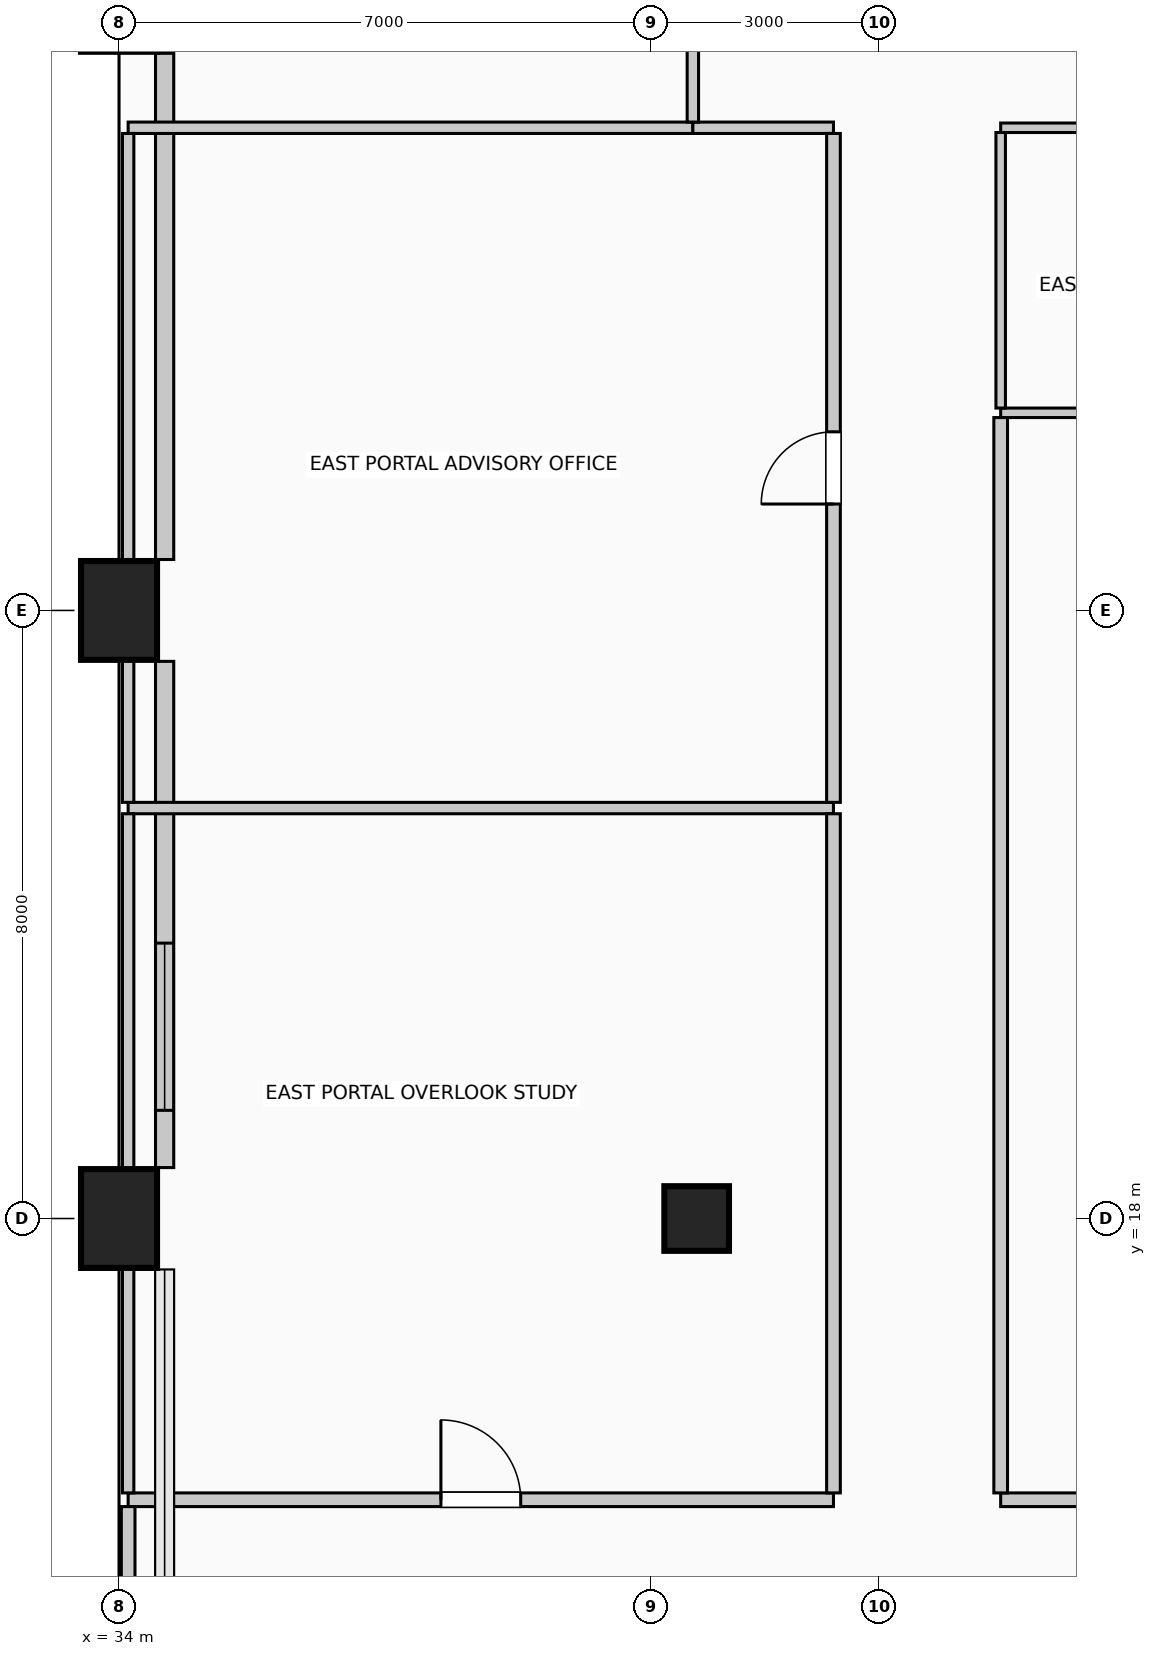
"""IFC4 building model, lengths in metres.
Left out: names, types, materials, properties, quantities, classifications, styles, units other than length and angle.
Written with IfcOpenShell. Run it as: python <this file> out.ifc"""

import sys

from ifc_helpers import new_model, si_unit, direction, frame, frame_2d, origin, origin_2d, place, context, subcontext, project, spatial, rectangle, circle, extrude, element, fill, save


model = new_model("IFC4")
c1 = context("Model", 3, precision=1e-05, world=origin(), true_north=direction((0.0, 1.0)))
c2 = subcontext(c1, "Body", "Model", "MODEL_VIEW")
j1 = project(units=[si_unit("LENGTHUNIT", "METRE"), si_unit("PLANEANGLEUNIT", "RADIAN")], contexts=[c1])
p1 = place(None, origin())
s1 = spatial("IfcSite", under=j1, at=p1, CompositionType="ELEMENT")
p2 = place(p1, origin())
s2 = spatial("IfcBuilding", under=s1, at=p2, CompositionType="ELEMENT")
p3 = place(p2, frame((0.0, 0.0, 190.6)))
s3 = spatial("IfcBuildingStorey", under=s2, at=p3, CompositionType="ELEMENT", Elevation=190.6)
for number, where, z_axis, x_axis in (
    (1, (34.0, 18.0, 0.0), (0.0, 0.0, 1.0), (1.0, 0.0, 0.0)),
    (2, (34.0, 26.0, 0.0), (0.0, 0.0, 1.0), (1.0, 0.0, 0.0)),
    (3, (34.0, 34.0, 0.0), (0.0, 0.0, 1.0), (1.0, 0.0, 0.0)),
):
    element("IfcColumn", number, at=place(p3, frame(where, z_axis=z_axis, x_axis=x_axis)), inside=s3, PredefinedType="COLUMN", context=c2, shape_type="SweptSolid", body=[
        extrude(rectangle(XDim=1.0, YDim=1.3, at=origin_2d()), origin(), (0.0, 0.0, 1.0), 4.0),
    ])
p4 = place(p3, frame((41.6, 18.0, 0.0), z_axis=(0.0, 0.0, 1.0), x_axis=(1.0, 0.0, 0.0)))
e4 = element("IfcColumn", 4, at=p4, inside=s3, PredefinedType="COLUMN", context=c2, shape_type="SweptSolid", body=[
    extrude(circle(Radius=0.425, at=origin_2d()), origin(), (0.0, 0.0, 1.0), 4.0),
])
p5 = place(p3, frame((34.6, 18.67, 0.0), z_axis=(0.0, 0.0, 1.0), x_axis=(0.0, 1.0, 0.0)))
e5 = element("IfcWall", 5, at=p5, inside=s3, PredefinedType="SOLIDWALL", context=c2, shape_type="SweptSolid", body=[
    extrude(rectangle(XDim=6.66, YDim=0.24, at=frame_2d((3.33, 0.0))), origin(), (0.0, 0.0, 1.0), 3.75),
])
p6 = place(p5, frame((0.753, 0.0, 0.42)))
e6 = element("IfcOpeningElement", 6, at=p6, cuts=e5, PredefinedType="OPENING", context=c2, shape_type="SweptSolid", body=[
    extrude(rectangle(XDim=2.2, YDim=1.95, at=frame_2d((1.1, 0.975))), frame((0.0, 0.13, 0.0), z_axis=(0.0, -1.0, 0.0), x_axis=(1.0, 0.0, 0.0)), (0.0, 0.0, 1.0), 0.26),
])
p7 = place(p3, frame((34.6, 26.67, 0.0), z_axis=(0.0, 0.0, 1.0), x_axis=(0.0, 1.0, 0.0)))
e7 = element("IfcWall", 7, at=p7, inside=s3, PredefinedType="SOLIDWALL", context=c2, shape_type="SweptSolid", body=[
    extrude(rectangle(XDim=6.66, YDim=0.24, at=frame_2d((3.33, 0.0))), origin(), (0.0, 0.0, 1.0), 3.75),
])
p8 = place(p3, frame((34.12, 14.3, 0.0), z_axis=(0.0, 0.0, 1.0), x_axis=(1.0, 0.0, 0.0)))
e8 = element("IfcWall", 8, at=p8, inside=s3, PredefinedType="PARTITIONING", context=c2, shape_type="SweptSolid", body=[
    extrude(rectangle(XDim=9.28, YDim=0.18, at=frame_2d((4.64, 0.0))), origin(), (0.0, 0.0, 1.0), 3.75),
])
p9 = place(p8, frame((4.115, 0.0, 0.0)))
e9 = element("IfcOpeningElement", 9, at=p9, cuts=e8, PredefinedType="OPENING", context=c2, shape_type="SweptSolid", body=[
    extrude(rectangle(XDim=1.05, YDim=2.15, at=frame_2d((0.525, 1.075))), frame((0.0, 0.1, 0.0), z_axis=(0.0, -1.0, 0.0), x_axis=(1.0, 0.0, 0.0)), (0.0, 0.0, 1.0), 0.2),
])
p10 = place(p3, frame((45.6, 14.3, 0.0), z_axis=(0.0, 0.0, 1.0), x_axis=(1.0, 0.0, 0.0)))
e10 = element("IfcWall", 10, at=p10, inside=s3, PredefinedType="PARTITIONING", context=c2, shape_type="SweptSolid", body=[
    extrude(rectangle(XDim=7.8, YDim=0.18, at=frame_2d((3.9, 0.0))), origin(), (0.0, 0.0, 1.0), 3.75),
])
p11 = place(p10, frame((3.425, 0.0, 0.0)))
e11 = element("IfcOpeningElement", 11, at=p11, cuts=e10, PredefinedType="OPENING", context=c2, shape_type="SweptSolid", body=[
    extrude(rectangle(XDim=0.95, YDim=2.15, at=frame_2d((0.475, 1.075))), frame((0.0, 0.1, 0.0), z_axis=(0.0, -1.0, 0.0), x_axis=(1.0, 0.0, 0.0)), (0.0, 0.0, 1.0), 0.2),
])
p12 = place(p3, frame((34.12, 23.4, 0.0), z_axis=(0.0, 0.0, 1.0), x_axis=(1.0, 0.0, 0.0)))
e12 = element("IfcWall", 12, at=p12, inside=s3, PredefinedType="PARTITIONING", context=c2, shape_type="SweptSolid", body=[
    extrude(rectangle(XDim=9.28, YDim=0.15, at=frame_2d((4.64, 0.0))), origin(), (0.0, 0.0, 1.0), 3.75),
])
p13 = place(p3, frame((45.6, 28.6, 0.0), z_axis=(0.0, 0.0, 1.0), x_axis=(1.0, 0.0, 0.0)))
e13 = element("IfcWall", 13, at=p13, inside=s3, PredefinedType="PARTITIONING", context=c2, shape_type="SweptSolid", body=[
    extrude(rectangle(XDim=4.6, YDim=0.125, at=frame_2d((2.3, 0.0))), origin(), (0.0, 0.0, 1.0), 3.75),
])
p14 = place(p3, frame((34.12, 32.35, 0.0), z_axis=(0.0, 0.0, 1.0), x_axis=(1.0, 0.0, 0.0)))
e14 = element("IfcWall", 14, at=p14, inside=s3, PredefinedType="PARTITIONING", context=c2, shape_type="SweptSolid", body=[
    extrude(rectangle(XDim=7.43, YDim=0.15, at=frame_2d((3.715, 0.0))), origin(), (0.0, 0.0, 1.0), 3.75),
])
p15 = place(p3, frame((41.55, 32.35, 0.0), z_axis=(0.0, 0.0, 1.0), x_axis=(1.0, 0.0, 0.0)))
e15 = element("IfcWall", 15, at=p15, inside=s3, PredefinedType="PARTITIONING", context=c2, shape_type="SweptSolid", body=[
    extrude(rectangle(XDim=1.85, YDim=0.15, at=frame_2d((0.925, 0.0))), origin(), (0.0, 0.0, 1.0), 3.75),
])
p16 = place(p3, frame((45.6, 32.35, 0.0), z_axis=(0.0, 0.0, 1.0), x_axis=(1.0, 0.0, 0.0)))
e16 = element("IfcWall", 16, at=p16, inside=s3, PredefinedType="PARTITIONING", context=c2, shape_type="SweptSolid", body=[
    extrude(rectangle(XDim=4.6, YDim=0.125, at=frame_2d((2.3, 0.0))), origin(), (0.0, 0.0, 1.0), 3.75),
])
p17 = place(p16, frame((1.84, 0.0, 0.0)))
e17 = element("IfcOpeningElement", 17, at=p17, cuts=e16, PredefinedType="OPENING", context=c2, shape_type="SweptSolid", body=[
    extrude(rectangle(XDim=0.92, YDim=2.1, at=frame_2d((0.46, 1.05))), frame((0.0, 0.073, 0.0), z_axis=(0.0, -1.0, 0.0), x_axis=(1.0, 0.0, 0.0)), (0.0, 0.0, 1.0), 0.145),
])
p18 = place(p3, frame((34.12, 12.29, 0.0), z_axis=(0.0, 0.0, 1.0), x_axis=(0.0, 1.0, 0.0)))
e18 = element("IfcWall", 18, at=p18, inside=s3, PredefinedType="PARTITIONING", context=c2, shape_type="SweptSolid", body=[
    extrude(rectangle(XDim=1.92, YDim=0.18, at=frame_2d((0.96, 0.0))), origin(), (0.0, 0.0, 1.0), 3.145),
])
p19 = place(p3, frame((34.12, 14.39, 0.0), z_axis=(0.0, 0.0, 1.0), x_axis=(0.0, 1.0, 0.0)))
e19 = element("IfcWall", 19, at=p19, inside=s3, PredefinedType="PARTITIONING", context=c2, shape_type="SweptSolid", body=[
    extrude(rectangle(XDim=2.96, YDim=0.15, at=frame_2d((1.48, 0.0))), origin(), (0.0, 0.0, 1.0), 3.145),
])
p20 = place(p3, frame((34.12, 18.65, 0.0), z_axis=(0.0, 0.0, 1.0), x_axis=(0.0, 1.0, 0.0)))
e20 = element("IfcWall", 20, at=p20, inside=s3, PredefinedType="PARTITIONING", context=c2, shape_type="SweptSolid", body=[
    extrude(rectangle(XDim=4.675, YDim=0.15, at=frame_2d((2.337, 0.0))), origin(), (0.0, 0.0, 1.0), 3.145),
])
p21 = place(p3, frame((34.12, 23.475, 0.0), z_axis=(0.0, 0.0, 1.0), x_axis=(0.0, 1.0, 0.0)))
e21 = element("IfcWall", 21, at=p21, inside=s3, PredefinedType="PARTITIONING", context=c2, shape_type="SweptSolid", body=[
    extrude(rectangle(XDim=1.875, YDim=0.15, at=frame_2d((0.938, 0.0))), origin(), (0.0, 0.0, 1.0), 3.145),
])
p22 = place(p3, frame((34.12, 26.65, 0.0), z_axis=(0.0, 0.0, 1.0), x_axis=(0.0, 1.0, 0.0)))
e22 = element("IfcWall", 22, at=p22, inside=s3, PredefinedType="PARTITIONING", context=c2, shape_type="SweptSolid", body=[
    extrude(rectangle(XDim=5.625, YDim=0.15, at=frame_2d((2.812, 0.0))), origin(), (0.0, 0.0, 1.0), 3.145),
])
p23 = place(p3, frame((41.55, 32.425, 0.0), z_axis=(0.0, 0.0, 1.0), x_axis=(0.0, 1.0, 0.0)))
e23 = element("IfcWall", 23, at=p23, inside=s3, PredefinedType="PARTITIONING", context=c2, shape_type="SweptSolid", body=[
    extrude(rectangle(XDim=1.15, YDim=0.15, at=frame_2d((0.575, 0.0))), origin(), (0.0, 0.0, 1.0), 3.145),
])
p24 = place(p3, frame((43.4, 14.39, 0.0), z_axis=(0.0, 0.0, 1.0), x_axis=(0.0, 1.0, 0.0)))
e24 = element("IfcWall", 24, at=p24, inside=s3, PredefinedType="PARTITIONING", context=c2, shape_type="SweptSolid", body=[
    extrude(rectangle(XDim=8.935, YDim=0.18, at=frame_2d((4.468, 0.0))), origin(), (0.0, 0.0, 1.0), 3.75),
])
p25 = place(p3, frame((43.4, 23.475, 0.0), z_axis=(0.0, 0.0, 1.0), x_axis=(0.0, 1.0, 0.0)))
e25 = element("IfcWall", 25, at=p25, inside=s3, PredefinedType="PARTITIONING", context=c2, shape_type="SweptSolid", body=[
    extrude(rectangle(XDim=8.8, YDim=0.18, at=frame_2d((4.4, 0.0))), origin(), (0.0, 0.0, 1.0), 3.75),
])
p26 = place(p25, frame((3.925, 0.0, 0.0)))
e26 = element("IfcOpeningElement", 26, at=p26, cuts=e25, PredefinedType="OPENING", context=c2, shape_type="SweptSolid", body=[
    extrude(rectangle(XDim=0.95, YDim=2.15, at=frame_2d((0.475, 1.075))), frame((0.0, 0.1, 0.0), z_axis=(0.0, -1.0, 0.0), x_axis=(1.0, 0.0, 0.0)), (0.0, 0.0, 1.0), 0.2),
])
p27 = place(p3, frame((45.6, 14.39, 0.0), z_axis=(0.0, 0.0, 1.0), x_axis=(0.0, 1.0, 0.0)))
e27 = element("IfcWall", 27, at=p27, inside=s3, PredefinedType="PARTITIONING", context=c2, shape_type="SweptSolid", body=[
    extrude(rectangle(XDim=14.148, YDim=0.18, at=frame_2d((7.074, 0.0))), origin(), (0.0, 0.0, 1.0), 3.75),
])
p28 = place(p3, frame((45.6, 28.663, 0.0), z_axis=(0.0, 0.0, 1.0), x_axis=(0.0, 1.0, 0.0)))
e28 = element("IfcWall", 28, at=p28, inside=s3, PredefinedType="PARTITIONING", context=c2, shape_type="SweptSolid", body=[
    extrude(rectangle(XDim=3.625, YDim=0.125, at=frame_2d((1.812, 0.0))), origin(), (0.0, 0.0, 1.0), 3.75),
])
p29 = place(p6, origin())
e29 = element("IfcWindow", 29, at=p29, inside=s3, PartitioningType="SINGLE_PANEL", PredefinedType="WINDOW", context=c2, shape_type="SweptSolid", body=[
    extrude(rectangle(XDim=2.2, YDim=1.95, at=frame_2d((1.1, 0.975))), frame((0.0, 0.03, 0.0), z_axis=(0.0, -1.0, 0.0), x_axis=(1.0, 0.0, 0.0)), (0.0, 0.0, 1.0), 0.06),
])
fill(e6, e29)
p30 = place(p9, origin())
e30 = element("IfcDoor", 30, at=p30, inside=s3, OperationType="SINGLE_SWING_LEFT", PredefinedType="DOOR", context=c2, shape_type="SweptSolid", body=[
    extrude(rectangle(XDim=1.05, YDim=2.15, at=frame_2d((0.525, 1.075))), frame((0.0, 0.025, 0.0), z_axis=(0.0, -1.0, 0.0), x_axis=(1.0, 0.0, 0.0)), (0.0, 0.0, 1.0), 0.05),
])
fill(e9, e30)
p31 = place(p26, origin())
e31 = element("IfcDoor", 31, at=p31, inside=s3, OperationType="SINGLE_SWING_LEFT", PredefinedType="DOOR", context=c2, shape_type="SweptSolid", body=[
    extrude(rectangle(XDim=0.95, YDim=2.15, at=frame_2d((0.475, 1.075))), frame((0.0, 0.025, 0.0), z_axis=(0.0, -1.0, 0.0), x_axis=(1.0, 0.0, 0.0)), (0.0, 0.0, 1.0), 0.05),
])
fill(e26, e31)
save(model, sys.argv[1])
